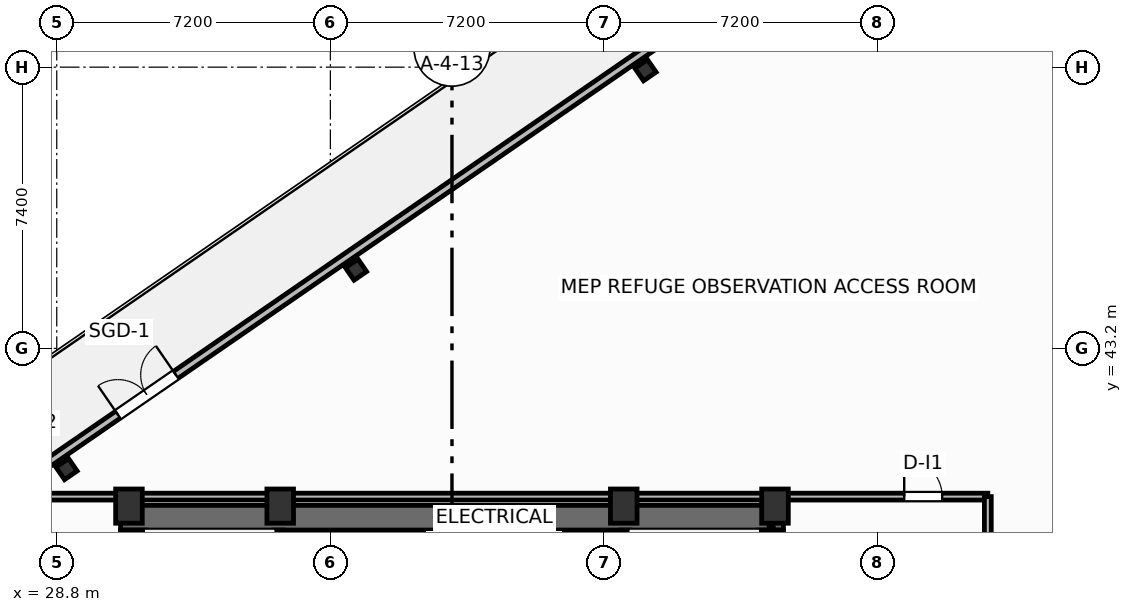
"""IFC4 building model, lengths in metres.
Left out: names, types, materials, properties, quantities, classifications, styles, units other than length and angle.
Written with IfcOpenShell. Run it as: python <this file> out.ifc"""

import sys

from ifc_helpers import new_model, si_unit, direction, frame, frame_2d, origin, origin_2d, place, context, subcontext, project, spatial, rectangle, i_section, extrude, element, fill, save


model = new_model("IFC4")
c1 = context("Model", 3, precision=1e-05, world=origin(), true_north=direction((0.0, 1.0)))
c2 = subcontext(c1, "Body", "Model", "MODEL_VIEW")
j1 = project(units=[si_unit("LENGTHUNIT", "METRE"), si_unit("PLANEANGLEUNIT", "RADIAN")], contexts=[c1])
p1 = place(None, origin())
s1 = spatial("IfcSite", under=j1, at=p1, CompositionType="ELEMENT")
p2 = place(p1, origin())
s2 = spatial("IfcBuilding", under=s1, at=p2, CompositionType="ELEMENT")
p3 = place(p2, frame((0.0, 0.0, 253.4)))
s3 = spatial("IfcBuildingStorey", under=s2, at=p3, CompositionType="ELEMENT", Elevation=253.4)
for number, where, z_axis, x_axis in (
    (1, (30.7, 39.05, 0.0), (0.0, 0.0, 1.0), (1.0, 0.0, 0.0)),
    (2, (34.68, 39.05, 0.0), (0.0, 0.0, 1.0), (1.0, 0.0, 0.0)),
    (3, (43.72, 39.05, 0.0), (0.0, 0.0, 1.0), (1.0, 0.0, 0.0)),
    (4, (47.7, 39.05, 0.0), (0.0, 0.0, 1.0), (1.0, 0.0, 0.0)),
):
    element("IfcColumn", number, at=place(p3, frame(where, z_axis=z_axis, x_axis=x_axis)), inside=s3, PredefinedType="COLUMN", context=c2, shape_type="SweptSolid", body=[
        extrude(rectangle(XDim=0.7, YDim=0.9, at=origin_2d()), origin(), (0.0, 0.0, 1.0), 4.8),
    ])
p4 = place(p3, frame((30.48, 38.745, 0.0), z_axis=(0.0, 0.0, 1.0), x_axis=(1.0, 0.0, 0.0)))
e5 = element("IfcWall", 5, at=p4, inside=s3, PredefinedType="SHEAR", context=c2, shape_type="SweptSolid", body=[
    extrude(rectangle(XDim=17.44, YDim=0.65, at=frame_2d((8.72, 0.0))), origin(), (0.0, 0.0, 1.0), 4.55),
])
p5 = place(p3, frame((30.805, 29.2, 0.0), z_axis=(0.0, 0.0, 1.0), x_axis=(0.0, 1.0, 0.0)))
e6 = element("IfcWall", 6, at=p5, inside=s3, PredefinedType="SHEAR", context=c2, shape_type="SweptSolid", body=[
    extrude(rectangle(XDim=9.22, YDim=0.65, at=frame_2d((4.61, 0.0))), origin(), (0.0, 0.0, 1.0), 4.55),
])
p6 = place(p5, frame((0.65, 0.0, 0.0)))
e7 = element("IfcOpeningElement", 7, at=p6, cuts=e6, PredefinedType="OPENING", context=c2, shape_type="SweptSolid", body=[
    extrude(rectangle(XDim=1.1, YDim=2.15, at=frame_2d((0.55, 1.075))), frame((0.0, 0.335, 0.0), z_axis=(0.0, -1.0, 0.0), x_axis=(1.0, 0.0, 0.0)), (0.0, 0.0, 1.0), 0.67),
])
p7 = place(p3, frame((47.595, 29.2, 0.0), z_axis=(0.0, 0.0, 1.0), x_axis=(0.0, 1.0, 0.0)))
e8 = element("IfcWall", 8, at=p7, inside=s3, PredefinedType="SHEAR", context=c2, shape_type="SweptSolid", body=[
    extrude(rectangle(XDim=9.22, YDim=0.65, at=frame_2d((4.61, 0.0))), origin(), (0.0, 0.0, 1.0), 4.55),
])
p8 = place(p3, frame((34.64, 29.2, 0.0), z_axis=(0.0, 0.0, 1.0), x_axis=(0.0, 1.0, 0.0)))
e9 = element("IfcWall", 9, at=p8, inside=s3, PredefinedType="SHEAR", context=c2, shape_type="SweptSolid", body=[
    extrude(rectangle(XDim=9.22, YDim=0.25, at=frame_2d((4.61, 0.0))), origin(), (0.0, 0.0, 1.0), 4.55),
])
p9 = place(p8, frame((0.65, 0.0, 0.0)))
e10 = element("IfcOpeningElement", 10, at=p9, cuts=e9, PredefinedType="OPENING", context=c2, shape_type="SweptSolid", body=[
    extrude(rectangle(XDim=1.05, YDim=2.15, at=frame_2d((0.525, 1.075))), frame((0.0, 0.135, 0.0), z_axis=(0.0, -1.0, 0.0), x_axis=(1.0, 0.0, 0.0)), (0.0, 0.0, 1.0), 0.27),
])
p10 = place(p3, frame((43.76, 29.2, 0.0), z_axis=(0.0, 0.0, 1.0), x_axis=(0.0, 1.0, 0.0)))
e11 = element("IfcWall", 11, at=p10, inside=s3, PredefinedType="SHEAR", context=c2, shape_type="SweptSolid", body=[
    extrude(rectangle(XDim=9.22, YDim=0.25, at=frame_2d((4.61, 0.0))), origin(), (0.0, 0.0, 1.0), 4.55),
])
p11 = place(p10, frame((0.65, 0.0, 0.0)))
e12 = element("IfcOpeningElement", 12, at=p11, cuts=e11, PredefinedType="OPENING", context=c2, shape_type="SweptSolid", body=[
    extrude(rectangle(XDim=1.05, YDim=2.15, at=frame_2d((0.525, 1.075))), frame((0.0, 0.135, 0.0), z_axis=(0.0, -1.0, 0.0), x_axis=(1.0, 0.0, 0.0)), (0.0, 0.0, 1.0), 0.27),
])
for number, where, z_axis, x_axis in (
    (13, (44.292, 50.519, -0.32), (0.0, 0.0, 1.0), (0.824, 0.567, 0.0)),
    (14, (36.675, 45.272, -0.32), (0.0, 0.0, 1.0), (0.824, 0.567, 0.0)),
    (15, (29.057, 40.025, -0.32), (0.0, 0.0, 1.0), (0.824, 0.567, 0.0)),
):
    element("IfcColumn", number, at=place(p3, frame(where, z_axis=z_axis, x_axis=x_axis)), inside=s3, PredefinedType="COLUMN", context=c2, shape_type="SweptSolid", body=[
        extrude(i_section(OverallWidth=0.401, OverallDepth=0.399, WebThickness=0.025, FlangeThickness=0.04, FilletRadius=0.022, at=origin_2d()), origin(), (0.0, 0.0, 1.0), 5.12),
    ])
p12 = place(p3, frame((7.331, 25.557, 0.0), z_axis=(0.0, 0.0, 1.0), x_axis=(0.823530664362, 0.567271755735, 0.0)))
e16 = element("IfcWall", 16, at=p12, inside=s3, PredefinedType="SOLIDWALL", context=c2, shape_type="SweptSolid", body=[
    extrude(rectangle(XDim=52.2, YDim=0.22, at=frame_2d((26.1, 0.0))), origin(), (0.0, 0.0, 1.0), 3.83),
])
p13 = place(p12, frame((28.025, 0.0, 0.0)))
e17 = element("IfcOpeningElement", 17, at=p13, cuts=e16, PredefinedType="OPENING", context=c2, shape_type="SweptSolid", body=[
    extrude(rectangle(XDim=1.85, YDim=2.3, at=frame_2d((0.925, 1.15))), frame((0.0, 0.12, 0.0), z_axis=(0.0, -1.0, 0.0), x_axis=(1.0, 0.0, 0.0)), (0.0, 0.0, 1.0), 0.24),
])
p14 = place(p12, frame((0.55, 0.0, 0.75)))
e18 = element("IfcOpeningElement", 18, at=p14, cuts=e16, PredefinedType="OPENING", context=c2, shape_type="SweptSolid", body=[
    extrude(rectangle(XDim=1.85, YDim=1.75, at=frame_2d((0.925, 0.875))), frame((0.0, 0.12, 0.0), z_axis=(0.0, -1.0, 0.0), x_axis=(1.0, 0.0, 0.0)), (0.0, 0.0, 1.0), 0.24),
])
p15 = place(p12, frame((49.8, 0.0, 0.75)))
e19 = element("IfcOpeningElement", 19, at=p15, cuts=e16, PredefinedType="OPENING", context=c2, shape_type="SweptSolid", body=[
    extrude(rectangle(XDim=1.85, YDim=1.75, at=frame_2d((0.925, 0.875))), frame((0.0, 0.12, 0.0), z_axis=(0.0, -1.0, 0.0), x_axis=(1.0, 0.0, 0.0)), (0.0, 0.0, 1.0), 0.24),
])
p16 = place(p3, frame((20.0, 39.3, 0.0), z_axis=(0.0, 0.0, 1.0), x_axis=(1.0, 0.0, 0.0)))
e20 = element("IfcWall", 20, at=p16, inside=s3, PredefinedType="PARTITIONING", context=c2, shape_type="SweptSolid", body=[
    extrude(rectangle(XDim=33.3, YDim=0.18, at=frame_2d((16.65, 0.0))), origin(), (0.0, 0.0, 1.0), 3.839),
])
p17 = place(p16, frame((31.1, 0.0, 0.0)))
e21 = element("IfcOpeningElement", 21, at=p17, cuts=e20, PredefinedType="OPENING", context=c2, shape_type="SweptSolid", body=[
    extrude(rectangle(XDim=1.0, YDim=2.05, at=frame_2d((0.5, 1.025))), frame((0.0, 0.1, 0.0), z_axis=(0.0, -1.0, 0.0), x_axis=(1.0, 0.0, 0.0)), (0.0, 0.0, 1.0), 0.2),
])
p18 = place(p3, frame((53.3, 29.02, 0.0), z_axis=(0.0, 0.0, 1.0), x_axis=(0.0, 1.0, 0.0)))
e22 = element("IfcWall", 22, at=p18, inside=s3, PredefinedType="PARTITIONING", context=c2, shape_type="SweptSolid", body=[
    extrude(rectangle(XDim=10.28, YDim=0.18, at=frame_2d((5.14, 0.0))), origin(), (0.0, 0.0, 1.0), 4.55),
])
p19 = place(p13, origin())
e23 = element("IfcDoor", 23, at=p19, inside=s3, OperationType="DOUBLE_DOOR_SINGLE_SWING", PredefinedType="DOOR", context=c2, shape_type="SweptSolid", body=[
    extrude(rectangle(XDim=1.85, YDim=2.3, at=frame_2d((0.925, 1.15))), frame((0.0, 0.025, 0.0), z_axis=(0.0, -1.0, 0.0), x_axis=(1.0, 0.0, 0.0)), (0.0, 0.0, 1.0), 0.05),
])
fill(e17, e23)
p20 = place(p17, origin())
e24 = element("IfcDoor", 24, at=p20, inside=s3, OperationType="SINGLE_SWING_LEFT", PredefinedType="DOOR", context=c2, shape_type="SweptSolid", body=[
    extrude(rectangle(XDim=1.0, YDim=2.05, at=frame_2d((0.5, 1.025))), frame((0.0, 0.025, 0.0), z_axis=(0.0, -1.0, 0.0), x_axis=(1.0, 0.0, 0.0)), (0.0, 0.0, 1.0), 0.05),
])
fill(e21, e24)
save(model, sys.argv[1])
